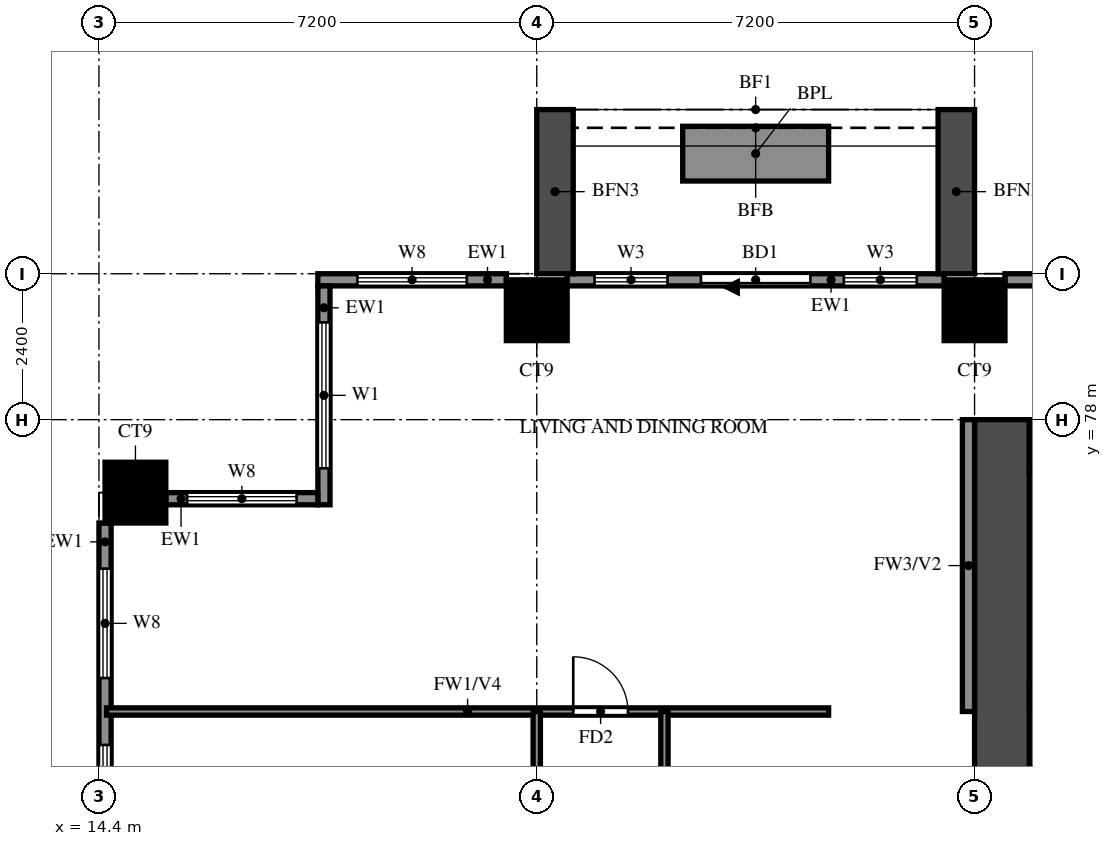
"""IFC4 building model, lengths in metres.
Left out: names, types, materials, properties, quantities, classifications, styles, units other than length and angle.
Written with IfcOpenShell. Run it as: python <this file> out.ifc"""

import sys

from ifc_helpers import new_model, si_unit, direction, frame, frame_2d, origin, origin_2d, place, context, subcontext, project, spatial, rectangle, extrude, source, transform, mapped, element, fill, save


model = new_model("IFC4")
c1 = context("Model", 3, precision=1e-05, world=origin(), true_north=direction((0.0, 1.0)))
c2 = subcontext(c1, "Body", "Model", "MODEL_VIEW")
j1 = project(units=[si_unit("LENGTHUNIT", "METRE"), si_unit("PLANEANGLEUNIT", "RADIAN")], contexts=[c1])
p1 = place(None, origin())
s1 = spatial("IfcSite", under=j1, at=p1, CompositionType="ELEMENT")
p2 = place(p1, origin())
s2 = spatial("IfcBuilding", under=s1, at=p2, CompositionType="ELEMENT")
p3 = place(p2, frame((0.0, 0.0, 83.0)))
s3 = spatial("IfcBuildingStorey", under=s2, at=p3, CompositionType="ELEMENT", Elevation=83.0)
m1 = source(origin(), c2, "Body", "SweptSolid", [
    extrude(rectangle(XDim=1.0, YDim=1.0, at=origin_2d()), origin(), (0.0, 0.0, 1.0), 3.18),
])
for number, where, z_axis, x_axis in (
    (1, (15.0, 76.8, 0.0), (0.0, 0.0, 1.0), (1.0, 0.0, 0.0)),
    (2, (21.6, 79.8, 0.0), (0.0, 0.0, 1.0), (1.0, 0.0, 0.0)),
    (3, (28.8, 79.8, 0.0), (0.0, 0.0, 1.0), (1.0, 0.0, 0.0)),
):
    element("IfcColumn", number, at=place(p3, frame(where, z_axis=z_axis, x_axis=x_axis)), inside=s3, PredefinedType="COLUMN", context=c2, shape_type="MappedRepresentation", body=[
        mapped(m1, transform((0.0, 0.0, 0.0))),
    ])
p4 = place(p3, frame((29.25, 66.0, 0.0), z_axis=(0.0, 0.0, 1.0), x_axis=(0.0, 1.0, 0.0)))
e4 = element("IfcWall", 4, at=p4, inside=s3, PredefinedType="SHEAR", context=c2, shape_type="SweptSolid", body=[
    extrude(rectangle(XDim=12.0, YDim=0.9, at=frame_2d((6.0, 0.0))), origin(), (0.0, 0.0, 1.0), 3.18),
])
p5 = place(p3, frame((29.7, 77.55, 0.0), z_axis=(0.0, 0.0, 1.0), x_axis=(1.0, 0.0, 0.0)))
e5 = element("IfcWall", 5, at=p5, inside=s3, PredefinedType="SHEAR", context=c2, shape_type="SweptSolid", body=[
    extrude(rectangle(XDim=41.4, YDim=0.9, at=frame_2d((20.7, 0.0))), origin(), (0.0, 0.0, 1.0), 3.18),
])
p6 = place(p3, frame((29.7, 73.475, 0.0), z_axis=(0.0, 0.0, 1.0), x_axis=(1.0, 0.0, 0.0)))
e6 = element("IfcWall", 6, at=p6, inside=s3, PredefinedType="SHEAR", context=c2, shape_type="SweptSolid", body=[
    extrude(rectangle(XDim=3.175, YDim=0.45, at=frame_2d((1.587, 0.0))), origin(), (0.0, 0.0, 1.0), 3.18),
])
p7 = place(p3, frame((35.5, 80.3, 0.0), z_axis=(0.0, 0.0, 1.0), x_axis=(-1.0, 0.0, 0.0)))
e7 = element("IfcWall", 7, at=p7, inside=s3, PredefinedType="SOLIDWALL", context=c2, shape_type="SweptSolid", body=[
    extrude(rectangle(XDim=6.2, YDim=0.2, at=frame_2d((3.1, 0.0))), origin(), (0.0, 0.0, 1.0), 3.18),
])
p8 = place(p3, frame((28.3, 80.3, 0.0), z_axis=(0.0, 0.0, 1.0), x_axis=(-1.0, 0.0, 0.0)))
e8 = element("IfcWall", 8, at=p8, inside=s3, PredefinedType="SOLIDWALL", context=c2, shape_type="SweptSolid", body=[
    extrude(rectangle(XDim=6.2, YDim=0.2, at=frame_2d((3.1, 0.0))), origin(), (0.0, 0.0, 1.0), 3.18),
])
p9 = place(p8, frame((2.2, 0.0, 0.0)))
e9 = element("IfcOpeningElement", 9, at=p9, cuts=e8, PredefinedType="OPENING", context=c2, shape_type="SweptSolid", body=[
    extrude(rectangle(XDim=1.8, YDim=2.4, at=frame_2d((0.9, 1.2))), frame((0.0, 0.11, 0.0), z_axis=(0.0, -1.0, 0.0), x_axis=(1.0, 0.0, 0.0)), (0.0, 0.0, 1.0), 0.22),
])
p10 = place(p8, frame((0.45, 0.0, 0.6)))
e10 = element("IfcOpeningElement", 10, at=p10, cuts=e8, PredefinedType="OPENING", context=c2, shape_type="SweptSolid", body=[
    extrude(rectangle(XDim=1.2, YDim=2.4, at=frame_2d((0.6, 1.2))), frame((0.0, 0.11, 0.0), z_axis=(0.0, -1.0, 0.0), x_axis=(1.0, 0.0, 0.0)), (0.0, 0.0, 1.0), 0.22),
])
p11 = place(p8, frame((4.55, 0.0, 0.6)))
e11 = element("IfcOpeningElement", 11, at=p11, cuts=e8, PredefinedType="OPENING", context=c2, shape_type="SweptSolid", body=[
    extrude(rectangle(XDim=1.2, YDim=2.4, at=frame_2d((0.6, 1.2))), frame((0.0, 0.11, 0.0), z_axis=(0.0, -1.0, 0.0), x_axis=(1.0, 0.0, 0.0)), (0.0, 0.0, 1.0), 0.22),
])
p12 = place(p3, frame((21.1, 80.3, 0.0), z_axis=(0.0, 0.0, 1.0), x_axis=(-1.0, 0.0, 0.0)))
e12 = element("IfcWall", 12, at=p12, inside=s3, PredefinedType="SOLIDWALL", context=c2, shape_type="SweptSolid", body=[
    extrude(rectangle(XDim=3.1, YDim=0.2, at=frame_2d((1.55, 0.0))), origin(), (0.0, 0.0, 1.0), 3.18),
])
p13 = place(p12, frame((0.65, 0.0, 0.6)))
e13 = element("IfcOpeningElement", 13, at=p13, cuts=e12, PredefinedType="OPENING", context=c2, shape_type="SweptSolid", body=[
    extrude(rectangle(XDim=1.8, YDim=2.4, at=frame_2d((0.9, 1.2))), frame((0.0, 0.11, 0.0), z_axis=(0.0, -1.0, 0.0), x_axis=(1.0, 0.0, 0.0)), (0.0, 0.0, 1.0), 0.22),
])
p14 = place(p3, frame((18.1, 80.2, 0.0), z_axis=(0.0, 0.0, 1.0), x_axis=(0.0, -1.0, 0.0)))
e14 = element("IfcWall", 14, at=p14, inside=s3, PredefinedType="SOLIDWALL", context=c2, shape_type="SweptSolid", body=[
    extrude(rectangle(XDim=3.6, YDim=0.2, at=frame_2d((1.8, 0.0))), origin(), (0.0, 0.0, 1.0), 3.18),
])
p15 = place(p14, frame((0.6, 0.0, 0.6)))
e15 = element("IfcOpeningElement", 15, at=p15, cuts=e14, PredefinedType="OPENING", context=c2, shape_type="SweptSolid", body=[
    extrude(rectangle(XDim=2.4, YDim=2.4, at=frame_2d((1.2, 1.2))), frame((0.0, 0.11, 0.0), z_axis=(0.0, -1.0, 0.0), x_axis=(1.0, 0.0, 0.0)), (0.0, 0.0, 1.0), 0.22),
])
p16 = place(p3, frame((18.0, 76.7, 0.0), z_axis=(0.0, 0.0, 1.0), x_axis=(-1.0, 0.0, 0.0)))
e16 = element("IfcWall", 16, at=p16, inside=s3, PredefinedType="SOLIDWALL", context=c2, shape_type="SweptSolid", body=[
    extrude(rectangle(XDim=2.5, YDim=0.2, at=frame_2d((1.25, 0.0))), origin(), (0.0, 0.0, 1.0), 3.18),
])
p17 = place(p16, frame((0.35, 0.0, 0.6)))
e17 = element("IfcOpeningElement", 17, at=p17, cuts=e16, PredefinedType="OPENING", context=c2, shape_type="SweptSolid", body=[
    extrude(rectangle(XDim=1.8, YDim=2.4, at=frame_2d((0.9, 1.2))), frame((0.0, 0.11, 0.0), z_axis=(0.0, -1.0, 0.0), x_axis=(1.0, 0.0, 0.0)), (0.0, 0.0, 1.0), 0.22),
])
p18 = place(p3, frame((14.5, 76.3, 0.0), z_axis=(0.0, 0.0, 1.0), x_axis=(0.0, -1.0, 0.0)))
e18 = element("IfcWall", 18, at=p18, inside=s3, PredefinedType="SOLIDWALL", context=c2, shape_type="SweptSolid", body=[
    extrude(rectangle(XDim=6.2, YDim=0.2, at=frame_2d((3.1, 0.0))), origin(), (0.0, 0.0, 1.0), 3.18),
])
p19 = place(p18, frame((3.65, 0.0, 0.6)))
e19 = element("IfcOpeningElement", 19, at=p19, cuts=e18, PredefinedType="OPENING", context=c2, shape_type="SweptSolid", body=[
    extrude(rectangle(XDim=1.8, YDim=2.4, at=frame_2d((0.9, 1.2))), frame((0.0, 0.11, 0.0), z_axis=(0.0, -1.0, 0.0), x_axis=(1.0, 0.0, 0.0)), (0.0, 0.0, 1.0), 0.22),
])
p20 = place(p18, frame((0.75, 0.0, 0.6)))
e20 = element("IfcOpeningElement", 20, at=p20, cuts=e18, PredefinedType="OPENING", context=c2, shape_type="SweptSolid", body=[
    extrude(rectangle(XDim=1.8, YDim=2.4, at=frame_2d((0.9, 1.2))), frame((0.0, 0.11, 0.0), z_axis=(0.0, -1.0, 0.0), x_axis=(1.0, 0.0, 0.0)), (0.0, 0.0, 1.0), 0.22),
])
for number, where, z_axis, x_axis in (
    (21, (28.5, 80.4, 0.0), (0.0, 0.0, 1.0), (0.0, 1.0, 0.0)),
    (22, (21.9, 80.4, 0.0), (0.0, 0.0, 1.0), (0.0, 1.0, 0.0)),
):
    element("IfcWall", number, at=place(p3, frame(where, z_axis=z_axis, x_axis=x_axis)), inside=s3, PredefinedType="SOLIDWALL", context=c2, shape_type="SweptSolid", body=[
        extrude(rectangle(XDim=2.7, YDim=0.6, at=frame_2d((1.35, 0.0))), origin(), (0.0, 0.0, 1.0), 2.85),
    ])
p21 = place(p3, frame((26.4, 82.375, 0.0), z_axis=(0.0, 0.0, 1.0), x_axis=(-1.0, 0.0, 0.0)))
e23 = element("IfcWall", 23, at=p21, inside=s3, PredefinedType="SOLIDWALL", context=c2, shape_type="SweptSolid", body=[
    extrude(rectangle(XDim=2.4, YDim=0.9, at=frame_2d((1.2, 0.0))), origin(), (0.0, 0.0, 1.0), 0.9),
])
p22 = place(p3, frame((28.7, 73.2, 0.0), z_axis=(0.0, 0.0, 1.0), x_axis=(0.0, 1.0, 0.0)))
e24 = element("IfcWall", 24, at=p22, inside=s3, PredefinedType="SOLIDWALL", context=c2, shape_type="SweptSolid", body=[
    extrude(rectangle(XDim=4.8, YDim=0.2, at=frame_2d((2.4, 0.0))), origin(), (0.0, 0.0, 1.0), 3.18),
])
p23 = place(p3, frame((14.525, 73.2, 0.0), z_axis=(0.0, 0.0, 1.0), x_axis=(1.0, 0.0, 0.0)))
e25 = element("IfcWall", 25, at=p23, inside=s3, PredefinedType="PARTITIONING", context=c2, shape_type="SweptSolid", body=[
    extrude(rectangle(XDim=11.875, YDim=0.12, at=frame_2d((5.938, 0.0))), origin(), (0.0, 0.0, 1.0), 2.28),
])
p24 = place(p23, frame((7.675, 0.0, 0.0)))
e26 = element("IfcOpeningElement", 26, at=p24, cuts=e25, PredefinedType="OPENING", context=c2, shape_type="SweptSolid", body=[
    extrude(rectangle(XDim=0.9, YDim=2.1, at=frame_2d((0.45, 1.05))), frame((0.0, 0.07, 0.0), z_axis=(0.0, -1.0, 0.0), x_axis=(1.0, 0.0, 0.0)), (0.0, 0.0, 1.0), 0.14),
])
p25 = place(p3, frame((21.6, 69.6, 0.0), z_axis=(0.0, 0.0, 1.0), x_axis=(0.0, 1.0, 0.0)))
e27 = element("IfcWall", 27, at=p25, inside=s3, PredefinedType="PARTITIONING", context=c2, shape_type="SweptSolid", body=[
    extrude(rectangle(XDim=3.6, YDim=0.12, at=frame_2d((1.8, 0.0))), origin(), (0.0, 0.0, 1.0), 3.18),
])
p26 = place(p25, frame((1.35, 0.0, 0.0)))
e28 = element("IfcOpeningElement", 28, at=p26, cuts=e27, PredefinedType="OPENING", context=c2, shape_type="SweptSolid", body=[
    extrude(rectangle(XDim=0.9, YDim=2.1, at=frame_2d((0.45, 1.05))), frame((0.0, 0.07, 0.0), z_axis=(0.0, -1.0, 0.0), x_axis=(1.0, 0.0, 0.0)), (0.0, 0.0, 1.0), 0.14),
])
p27 = place(p3, frame((23.7, 64.8, 0.0), z_axis=(0.0, 0.0, 1.0), x_axis=(0.0, 1.0, 0.0)))
e29 = element("IfcWall", 29, at=p27, inside=s3, PredefinedType="PARTITIONING", context=c2, shape_type="SweptSolid", body=[
    extrude(rectangle(XDim=8.4, YDim=0.12, at=frame_2d((4.2, 0.0))), origin(), (0.0, 0.0, 1.0), 3.18),
])
p28 = place(p27, frame((1.875, 0.0, 0.0)))
e30 = element("IfcOpeningElement", 30, at=p28, cuts=e29, PredefinedType="OPENING", context=c2, shape_type="SweptSolid", body=[
    extrude(rectangle(XDim=0.9, YDim=2.1, at=frame_2d((0.45, 1.05))), frame((0.0, 0.07, 0.0), z_axis=(0.0, -1.0, 0.0), x_axis=(1.0, 0.0, 0.0)), (0.0, 0.0, 1.0), 0.14),
])
p29 = place(p27, frame((6.075, 0.0, 0.0)))
e31 = element("IfcOpeningElement", 31, at=p29, cuts=e29, PredefinedType="OPENING", context=c2, shape_type="SweptSolid", body=[
    extrude(rectangle(XDim=0.9, YDim=2.1, at=frame_2d((0.45, 1.05))), frame((0.0, 0.07, 0.0), z_axis=(0.0, -1.0, 0.0), x_axis=(1.0, 0.0, 0.0)), (0.0, 0.0, 1.0), 0.14),
])
p30 = place(p9, origin())
e32 = element("IfcDoor", 32, at=p30, inside=s3, OperationType="DOUBLE_DOOR_SLIDING", PredefinedType="DOOR", context=c2, shape_type="SweptSolid", body=[
    extrude(rectangle(XDim=1.8, YDim=2.4, at=frame_2d((0.9, 1.2))), frame((0.0, 0.025, 0.0), z_axis=(0.0, -1.0, 0.0), x_axis=(1.0, 0.0, 0.0)), (0.0, 0.0, 1.0), 0.05),
])
fill(e9, e32)
p31 = place(p10, origin())
e33 = element("IfcWindow", 33, at=p31, inside=s3, PartitioningType="SINGLE_PANEL", PredefinedType="WINDOW", context=c2, shape_type="SweptSolid", body=[
    extrude(rectangle(XDim=1.2, YDim=2.4, at=frame_2d((0.6, 1.2))), frame((0.0, 0.03, 0.0), z_axis=(0.0, -1.0, 0.0), x_axis=(1.0, 0.0, 0.0)), (0.0, 0.0, 1.0), 0.06),
])
fill(e10, e33)
p32 = place(p11, origin())
e34 = element("IfcWindow", 34, at=p32, inside=s3, PartitioningType="SINGLE_PANEL", PredefinedType="WINDOW", context=c2, shape_type="SweptSolid", body=[
    extrude(rectangle(XDim=1.2, YDim=2.4, at=frame_2d((0.6, 1.2))), frame((0.0, 0.03, 0.0), z_axis=(0.0, -1.0, 0.0), x_axis=(1.0, 0.0, 0.0)), (0.0, 0.0, 1.0), 0.06),
])
fill(e11, e34)
p33 = place(p13, origin())
e35 = element("IfcWindow", 35, at=p33, inside=s3, PartitioningType="DOUBLE_PANEL_VERTICAL", PredefinedType="WINDOW", context=c2, shape_type="SweptSolid", body=[
    extrude(rectangle(XDim=1.8, YDim=2.4, at=frame_2d((0.9, 1.2))), frame((0.0, 0.03, 0.0), z_axis=(0.0, -1.0, 0.0), x_axis=(1.0, 0.0, 0.0)), (0.0, 0.0, 1.0), 0.06),
])
fill(e13, e35)
p34 = place(p15, origin())
e36 = element("IfcWindow", 36, at=p34, inside=s3, PartitioningType="DOUBLE_PANEL_VERTICAL", PredefinedType="WINDOW", context=c2, shape_type="SweptSolid", body=[
    extrude(rectangle(XDim=2.4, YDim=2.4, at=frame_2d((1.2, 1.2))), frame((0.0, 0.03, 0.0), z_axis=(0.0, -1.0, 0.0), x_axis=(1.0, 0.0, 0.0)), (0.0, 0.0, 1.0), 0.06),
])
fill(e15, e36)
p35 = place(p17, origin())
e37 = element("IfcWindow", 37, at=p35, inside=s3, PartitioningType="DOUBLE_PANEL_VERTICAL", PredefinedType="WINDOW", context=c2, shape_type="SweptSolid", body=[
    extrude(rectangle(XDim=1.8, YDim=2.4, at=frame_2d((0.9, 1.2))), frame((0.0, 0.03, 0.0), z_axis=(0.0, -1.0, 0.0), x_axis=(1.0, 0.0, 0.0)), (0.0, 0.0, 1.0), 0.06),
])
fill(e17, e37)
p36 = place(p19, origin())
e38 = element("IfcWindow", 38, at=p36, inside=s3, PartitioningType="DOUBLE_PANEL_VERTICAL", PredefinedType="WINDOW", context=c2, shape_type="SweptSolid", body=[
    extrude(rectangle(XDim=1.8, YDim=2.4, at=frame_2d((0.9, 1.2))), frame((0.0, 0.03, 0.0), z_axis=(0.0, -1.0, 0.0), x_axis=(1.0, 0.0, 0.0)), (0.0, 0.0, 1.0), 0.06),
])
fill(e19, e38)
p37 = place(p20, origin())
e39 = element("IfcWindow", 39, at=p37, inside=s3, PartitioningType="DOUBLE_PANEL_VERTICAL", PredefinedType="WINDOW", context=c2, shape_type="SweptSolid", body=[
    extrude(rectangle(XDim=1.8, YDim=2.4, at=frame_2d((0.9, 1.2))), frame((0.0, 0.03, 0.0), z_axis=(0.0, -1.0, 0.0), x_axis=(1.0, 0.0, 0.0)), (0.0, 0.0, 1.0), 0.06),
])
fill(e20, e39)
p38 = place(p24, origin())
e40 = element("IfcDoor", 40, at=p38, inside=s3, OperationType="SINGLE_SWING_RIGHT", PredefinedType="DOOR", context=c2, shape_type="SweptSolid", body=[
    extrude(rectangle(XDim=0.9, YDim=2.1, at=frame_2d((0.45, 1.05))), frame((0.0, 0.025, 0.0), z_axis=(0.0, -1.0, 0.0), x_axis=(1.0, 0.0, 0.0)), (0.0, 0.0, 1.0), 0.05),
])
fill(e26, e40)
save(model, sys.argv[1])
